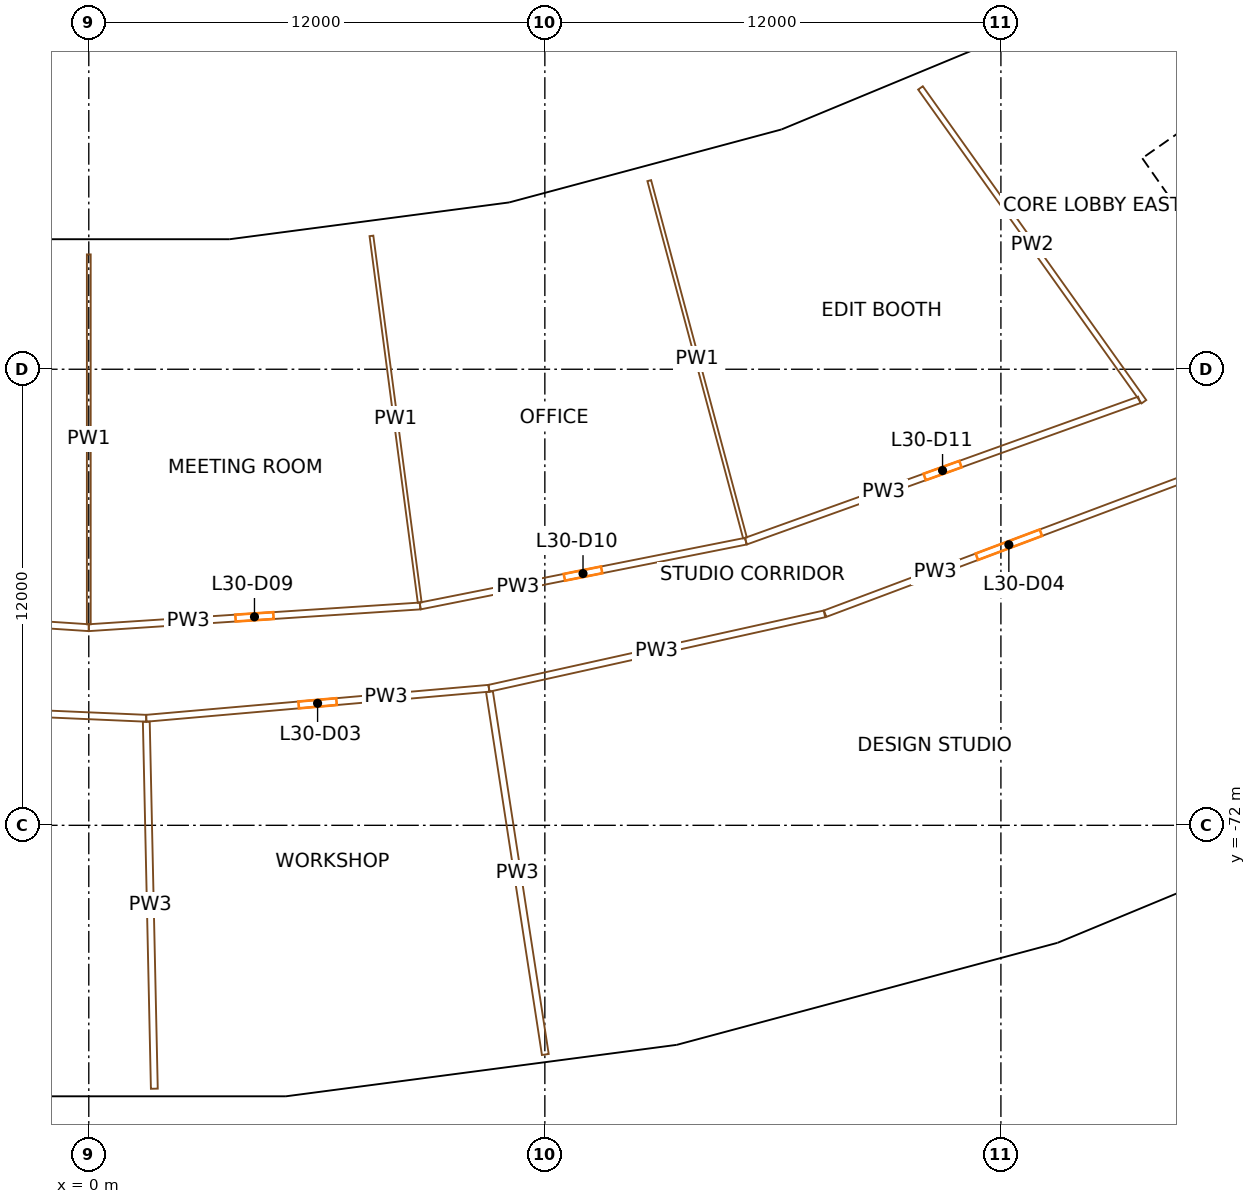
"""IFC4 building model, lengths in metres.
Left out: names, types, materials, properties, quantities, classifications, styles, units other than length and angle.
Written with IfcOpenShell. Run it as: python <this file> out.ifc"""

import sys

from ifc_helpers import new_model, si_unit, direction, frame, frame_2d, origin, origin_2d, place, context, subcontext, project, spatial, rectangle, extrude, element, fill, save


model = new_model("IFC4")
c1 = context("Model", 3, precision=1e-05, world=origin(), true_north=direction((0.0, 1.0)))
c2 = subcontext(c1, "Body", "Model", "MODEL_VIEW")
j1 = project(units=[si_unit("LENGTHUNIT", "METRE"), si_unit("PLANEANGLEUNIT", "RADIAN")], contexts=[c1])
p1 = place(None, origin())
s1 = spatial("IfcSite", under=j1, at=p1, CompositionType="ELEMENT")
p2 = place(p1, origin())
s2 = spatial("IfcBuilding", under=s1, at=p2, CompositionType="ELEMENT")
p3 = place(p2, frame((0.0, 0.0, 132.9)))
s3 = spatial("IfcBuildingStorey", under=s2, at=p3, CompositionType="ELEMENT", Elevation=132.9)
for number, where, z_axis, x_axis in (
    (1, (3.81, -58.125, 0.0), (0.0, 0.0, 1.0), (0.998, 0.065, 0.0)),
    (2, (5.085, -77.583, 0.0), (0.0, 0.0, 1.0), (0.998, 0.065, 0.0)),
    (3, (11.364, -57.131, 0.0), (0.0, 0.0, 1.0), (0.981, 0.195, 0.0)),
    (4, (15.168, -76.256, 0.0), (0.0, 0.0, 1.0), (0.981, 0.195, 0.0)),
    (5, (18.724, -55.159, 0.0), (0.0, 0.0, 1.0), (0.947, 0.321, 0.0)),
    (6, (24.992, -73.624, 0.0), (0.0, 0.0, 1.0), (0.947, 0.321, 0.0)),
    (7, (25.763, -52.243, 0.0), (0.0, 0.0, 1.0), (0.897, 0.442, 0.0)),
):
    element("IfcColumn", number, at=place(p3, frame(where, z_axis=z_axis, x_axis=x_axis)), inside=s3, PredefinedType="COLUMN", context=c2, shape_type="SweptSolid", body=[
        extrude(rectangle(XDim=1.2, YDim=1.5, at=origin_2d()), origin(), (0.0, 0.0, 1.0), 3.8),
    ])
p4 = place(p3, frame((36.717, -66.337, 0.0), z_axis=(0.0, 0.0, 1.0), x_axis=(-0.573577477574, 0.819151315216, 0.0)))
e8 = element("IfcWall", 8, at=p4, inside=s3, PredefinedType="SHEAR", context=c2, shape_type="SweptSolid", body=[
    extrude(rectangle(XDim=14.8, YDim=0.9, at=frame_2d((7.4, 0.0))), origin(), (0.0, 0.0, 1.0), 3.5),
])
p5 = place(p4, frame((6.2, 0.0, 0.0)))
e9 = element("IfcOpeningElement", 9, at=p5, cuts=e8, PredefinedType="OPENING", context=c2, shape_type="SweptSolid", body=[
    extrude(rectangle(XDim=2.4, YDim=2.1, at=frame_2d((1.2, 1.05))), frame((0.0, 0.46, 0.0), z_axis=(0.0, -1.0, 0.0), x_axis=(1.0, 0.0, 0.0)), (0.0, 0.0, 1.0), 0.92),
])
p6 = place(p3, frame((28.854, -54.324, 0.0), z_axis=(0.0, 0.0, 1.0), x_axis=(0.819145767589, 0.573585400304, 0.0)))
e10 = element("IfcWall", 10, at=p6, inside=s3, PredefinedType="SHEAR", context=c2, shape_type="SweptSolid", body=[
    extrude(rectangle(XDim=15.045, YDim=0.9, at=frame_2d((7.523, 0.0))), origin(), (0.0, 0.0, 1.0), 3.5),
])
p7 = place(p6, frame((0.5, 0.0, 0.0)))
e11 = element("IfcOpeningElement", 11, at=p7, cuts=e10, PredefinedType="OPENING", context=c2, shape_type="SweptSolid", body=[
    extrude(rectangle(XDim=1.0, YDim=2.1, at=frame_2d((0.5, 1.05))), frame((0.0, 0.46, 0.0), z_axis=(0.0, -1.0, 0.0), x_axis=(1.0, 0.0, 0.0)), (0.0, 0.0, 1.0), 0.92),
])
p8 = place(p6, frame((2.625, 0.0, 0.0)))
e12 = element("IfcOpeningElement", 12, at=p8, cuts=e10, PredefinedType="OPENING", context=c2, shape_type="SweptSolid", body=[
    extrude(rectangle(XDim=1.0, YDim=2.1, at=frame_2d((0.5, 1.05))), frame((0.0, 0.46, 0.0), z_axis=(0.0, -1.0, 0.0), x_axis=(1.0, 0.0, 0.0)), (0.0, 0.0, 1.0), 0.92),
])
p9 = place(p6, frame((5.625, 0.0, 0.0)))
e13 = element("IfcOpeningElement", 13, at=p9, cuts=e10, PredefinedType="OPENING", context=c2, shape_type="SweptSolid", body=[
    extrude(rectangle(XDim=0.9, YDim=2.1, at=frame_2d((0.45, 1.05))), frame((0.0, 0.46, 0.0), z_axis=(0.0, -1.0, 0.0), x_axis=(1.0, 0.0, 0.0)), (0.0, 0.0, 1.0), 0.92),
])
p10 = place(p6, frame((13.495, 0.0, 0.0)))
e14 = element("IfcOpeningElement", 14, at=p10, cuts=e10, PredefinedType="OPENING", context=c2, shape_type="SweptSolid", body=[
    extrude(rectangle(XDim=1.1, YDim=2.1, at=frame_2d((0.55, 1.05))), frame((0.0, 0.46, 0.0), z_axis=(0.0, -1.0, 0.0), x_axis=(1.0, 0.0, 0.0)), (0.0, 0.0, 1.0), 0.92),
])
p11 = place(p3, frame((11.125, -55.804, 0.0), z_axis=(0.0, 0.0, 1.0), x_axis=(-0.991444533306, -0.130528684121, 0.0)))
e15 = element("IfcWall", 15, at=p11, inside=s3, PredefinedType="SOLIDWALL", context=c2, shape_type="SweptSolid", body=[
    extrude(rectangle(XDim=7.493, YDim=0.4, at=frame_2d((3.747, 0.0))), origin(), (0.0, 0.0, 1.0), 2.7),
])
p12 = place(p11, frame((4.301, 0.0, 0.9)))
e16 = element("IfcOpeningElement", 16, at=p12, cuts=e15, PredefinedType="OPENING", context=c2, shape_type="SweptSolid", body=[
    extrude(rectangle(XDim=2.6, YDim=1.65, at=frame_2d((1.3, 0.825))), frame((0.0, 0.21, 0.0), z_axis=(0.0, -1.0, 0.0), x_axis=(1.0, 0.0, 0.0)), (0.0, 0.0, 1.0), 0.42),
])
p13 = place(p11, frame((0.592, 0.0, 0.9)))
e17 = element("IfcOpeningElement", 17, at=p13, cuts=e15, PredefinedType="OPENING", context=c2, shape_type="SweptSolid", body=[
    extrude(rectangle(XDim=2.6, YDim=1.65, at=frame_2d((1.3, 0.825))), frame((0.0, 0.21, 0.0), z_axis=(0.0, -1.0, 0.0), x_axis=(1.0, 0.0, 0.0)), (0.0, 0.0, 1.0), 0.42),
])
p14 = place(p3, frame((18.241, -53.894, 0.0), z_axis=(0.0, 0.0, 1.0), x_axis=(-0.965924597867, -0.258823629594, 0.0)))
e18 = element("IfcWall", 18, at=p14, inside=s3, PredefinedType="SOLIDWALL", context=c2, shape_type="SweptSolid", body=[
    extrude(rectangle(XDim=7.342, YDim=0.4, at=frame_2d((3.671, 0.0))), origin(), (0.0, 0.0, 1.0), 2.7),
])
p15 = place(p14, frame((4.225, 0.0, 0.9)))
e19 = element("IfcOpeningElement", 19, at=p15, cuts=e18, PredefinedType="OPENING", context=c2, shape_type="SweptSolid", body=[
    extrude(rectangle(XDim=2.6, YDim=1.65, at=frame_2d((1.3, 0.825))), frame((0.0, 0.21, 0.0), z_axis=(0.0, -1.0, 0.0), x_axis=(1.0, 0.0, 0.0)), (0.0, 0.0, 1.0), 0.42),
])
p16 = place(p14, frame((0.517, 0.0, 0.9)))
e20 = element("IfcOpeningElement", 20, at=p16, cuts=e18, PredefinedType="OPENING", context=c2, shape_type="SweptSolid", body=[
    extrude(rectangle(XDim=2.6, YDim=1.65, at=frame_2d((1.3, 0.825))), frame((0.0, 0.21, 0.0), z_axis=(0.0, -1.0, 0.0), x_axis=(1.0, 0.0, 0.0)), (0.0, 0.0, 1.0), 0.42),
])
p17 = place(p3, frame((25.189, -51.023, 0.0), z_axis=(0.0, 0.0, 1.0), x_axis=(-0.923879826967, -0.382682721486, 0.0)))
e21 = element("IfcWall", 21, at=p17, inside=s3, PredefinedType="SOLIDWALL", context=c2, shape_type="SweptSolid", body=[
    extrude(rectangle(XDim=7.493, YDim=0.4, at=frame_2d((3.747, 0.0))), origin(), (0.0, 0.0, 1.0), 2.7),
])
p18 = place(p17, frame((4.301, 0.0, 0.9)))
e22 = element("IfcOpeningElement", 22, at=p18, cuts=e21, PredefinedType="OPENING", context=c2, shape_type="SweptSolid", body=[
    extrude(rectangle(XDim=2.6, YDim=1.65, at=frame_2d((1.3, 0.825))), frame((0.0, 0.21, 0.0), z_axis=(0.0, -1.0, 0.0), x_axis=(1.0, 0.0, 0.0)), (0.0, 0.0, 1.0), 0.42),
])
p19 = place(p17, frame((0.592, 0.0, 0.9)))
e23 = element("IfcOpeningElement", 23, at=p19, cuts=e21, PredefinedType="OPENING", context=c2, shape_type="SweptSolid", body=[
    extrude(rectangle(XDim=2.6, YDim=1.65, at=frame_2d((1.3, 0.825))), frame((0.0, 0.21, 0.0), z_axis=(0.0, -1.0, 0.0), x_axis=(1.0, 0.0, 0.0)), (0.0, 0.0, 1.0), 0.42),
])
p20 = place(p3, frame((3.671, -56.779, 0.0), z_axis=(0.0, 0.0, 1.0), x_axis=(-1.0, 0.0, 0.0)))
e24 = element("IfcWall", 24, at=p20, inside=s3, PredefinedType="SOLIDWALL", context=c2, shape_type="SweptSolid", body=[
    extrude(rectangle(XDim=7.341, YDim=0.4, at=frame_2d((3.671, 0.0))), origin(), (0.0, 0.0, 1.0), 2.7),
])
p21 = place(p20, frame((4.225, 0.0, 0.9)))
e25 = element("IfcOpeningElement", 25, at=p21, cuts=e24, PredefinedType="OPENING", context=c2, shape_type="SweptSolid", body=[
    extrude(rectangle(XDim=2.6, YDim=1.65, at=frame_2d((1.3, 0.825))), frame((0.0, 0.21, 0.0), z_axis=(0.0, -1.0, 0.0), x_axis=(1.0, 0.0, 0.0)), (0.0, 0.0, 1.0), 0.42),
])
p22 = place(p20, frame((0.517, 0.0, 0.9)))
e26 = element("IfcOpeningElement", 26, at=p22, cuts=e24, PredefinedType="OPENING", context=c2, shape_type="SweptSolid", body=[
    extrude(rectangle(XDim=2.6, YDim=1.65, at=frame_2d((1.3, 0.825))), frame((0.0, 0.21, 0.0), z_axis=(0.0, -1.0, 0.0), x_axis=(1.0, 0.0, 0.0)), (0.0, 0.0, 1.0), 0.42),
])
p23 = place(p3, frame((-8.719, -66.229, 0.0), z_axis=(0.0, 0.0, 1.0), x_axis=(0.997858593599, -0.065408158359, 0.0)))
e27 = element("IfcWall", 27, at=p23, inside=s3, PredefinedType="PARTITIONING", context=c2, shape_type="SweptSolid", body=[
    extrude(rectangle(XDim=8.738, YDim=0.18, at=frame_2d((4.369, 0.0))), origin(), (0.0, 0.0, 1.0), 2.4),
])
p24 = place(p23, frame((3.869, 0.0, 0.0)))
e28 = element("IfcOpeningElement", 28, at=p24, cuts=e27, PredefinedType="OPENING", context=c2, shape_type="SweptSolid", body=[
    extrude(rectangle(XDim=1.0, YDim=2.1, at=frame_2d((0.5, 1.05))), frame((0.0, 0.1, 0.0), z_axis=(0.0, -1.0, 0.0), x_axis=(1.0, 0.0, 0.0)), (0.0, 0.0, 1.0), 0.2),
])
p25 = place(p3, frame((-7.523, -68.789, 0.0), z_axis=(0.0, 0.0, 1.0), x_axis=(0.999048962102, -0.043602423354, 0.0)))
e29 = element("IfcWall", 29, at=p25, inside=s3, PredefinedType="PARTITIONING", context=c2, shape_type="SweptSolid", body=[
    extrude(rectangle(XDim=9.043, YDim=0.18, at=frame_2d((4.521, 0.0))), origin(), (0.0, 0.0, 1.0), 2.4),
])
p26 = place(p3, frame((0.0, -66.8, 0.0), z_axis=(0.0, 0.0, 1.0), x_axis=(0.997858593599, 0.065408158359, 0.0)))
e30 = element("IfcWall", 30, at=p26, inside=s3, PredefinedType="PARTITIONING", context=c2, shape_type="SweptSolid", body=[
    extrude(rectangle(XDim=8.738, YDim=0.18, at=frame_2d((4.369, 0.0))), origin(), (0.0, 0.0, 1.0), 2.4),
])
p27 = place(p26, frame((3.869, 0.0, 0.0)))
e31 = element("IfcOpeningElement", 31, at=p27, cuts=e30, PredefinedType="OPENING", context=c2, shape_type="SweptSolid", body=[
    extrude(rectangle(XDim=1.0, YDim=2.1, at=frame_2d((0.5, 1.05))), frame((0.0, 0.1, 0.0), z_axis=(0.0, -1.0, 0.0), x_axis=(1.0, 0.0, 0.0)), (0.0, 0.0, 1.0), 0.2),
])
p28 = place(p3, frame((0.0, -56.979, 0.0), z_axis=(0.0, 0.0, 1.0), x_axis=(0.0, -1.0, 0.0)))
e32 = element("IfcWall", 32, at=p28, inside=s3, PredefinedType="PARTITIONING", context=c2, shape_type="SweptSolid", body=[
    extrude(rectangle(XDim=9.731, YDim=0.1, at=frame_2d((4.866, 0.0))), origin(), (0.0, 0.0, 1.0), 2.4),
])
p29 = place(p3, frame((10.529, -68.394, 0.0), z_axis=(0.0, 0.0, 1.0), x_axis=(-0.996190935779, -0.087198735491, 0.0)))
e33 = element("IfcWall", 33, at=p29, inside=s3, PredefinedType="PARTITIONING", context=c2, shape_type="SweptSolid", body=[
    extrude(rectangle(XDim=9.052, YDim=0.18, at=frame_2d((4.526, 0.0))), origin(), (0.0, 0.0, 1.0), 2.4),
])
p30 = place(p29, frame((4.026, 0.0, 0.0)))
e34 = element("IfcOpeningElement", 34, at=p30, cuts=e33, PredefinedType="OPENING", context=c2, shape_type="SweptSolid", body=[
    extrude(rectangle(XDim=1.0, YDim=2.1, at=frame_2d((0.5, 1.05))), frame((0.0, 0.1, 0.0), z_axis=(0.0, -1.0, 0.0), x_axis=(1.0, 0.0, 0.0)), (0.0, 0.0, 1.0), 0.2),
])
p31 = place(p3, frame((1.724, -78.93, 0.0), z_axis=(0.0, 0.0, 1.0), x_axis=(-0.021838346282, 0.999761514878, 0.0)))
e35 = element("IfcWall", 35, at=p31, inside=s3, PredefinedType="PARTITIONING", context=c2, shape_type="SweptSolid", body=[
    extrude(rectangle(XDim=9.659, YDim=0.18, at=frame_2d((4.83, 0.0))), origin(), (0.0, 0.0, 1.0), 2.4),
])
p32 = place(p3, frame((7.437, -56.491, 0.0), z_axis=(0.0, 0.0, 1.0), x_axis=(0.130531739513, -0.991444131043, 0.0)))
e36 = element("IfcWall", 36, at=p32, inside=s3, PredefinedType="PARTITIONING", context=c2, shape_type="SweptSolid", body=[
    extrude(rectangle(XDim=9.731, YDim=0.1, at=frame_2d((4.866, 0.0))), origin(), (0.0, 0.0, 1.0), 2.4),
])
p33 = place(p3, frame((8.719, -66.229, 0.0), z_axis=(0.0, 0.0, 1.0), x_axis=(0.980786466832, 0.195084357342, 0.0)))
e37 = element("IfcWall", 37, at=p33, inside=s3, PredefinedType="PARTITIONING", context=c2, shape_type="SweptSolid", body=[
    extrude(rectangle(XDim=8.738, YDim=0.18, at=frame_2d((4.369, 0.0))), origin(), (0.0, 0.0, 1.0), 2.4),
])
p34 = place(p33, frame((3.869, 0.0, 0.0)))
e38 = element("IfcOpeningElement", 38, at=p34, cuts=e37, PredefinedType="OPENING", context=c2, shape_type="SweptSolid", body=[
    extrude(rectangle(XDim=1.0, YDim=2.1, at=frame_2d((0.5, 1.05))), frame((0.0, 0.1, 0.0), z_axis=(0.0, -1.0, 0.0), x_axis=(1.0, 0.0, 0.0)), (0.0, 0.0, 1.0), 0.2),
])
p35 = place(p3, frame((10.529, -68.394, 0.0), z_axis=(0.0, 0.0, 1.0), x_axis=(0.976293034631, 0.216453021533, 0.0)))
e39 = element("IfcWall", 39, at=p35, inside=s3, PredefinedType="PARTITIONING", context=c2, shape_type="SweptSolid", body=[
    extrude(rectangle(XDim=9.042, YDim=0.18, at=frame_2d((4.521, 0.0))), origin(), (0.0, 0.0, 1.0), 2.4),
])
p36 = place(p3, frame((12.012, -78.03, 0.0), z_axis=(0.0, 0.0, 1.0), x_axis=(-0.152159747281, 0.988355913276, 0.0)))
e40 = element("IfcWall", 40, at=p36, inside=s3, PredefinedType="PARTITIONING", context=c2, shape_type="SweptSolid", body=[
    extrude(rectangle(XDim=9.659, YDim=0.18, at=frame_2d((4.83, 0.0))), origin(), (0.0, 0.0, 1.0), 2.4),
])
p37 = place(p3, frame((14.747, -55.037, 0.0), z_axis=(0.0, 0.0, 1.0), x_axis=(0.258828880572, -0.965923190829, 0.0)))
e41 = element("IfcWall", 41, at=p37, inside=s3, PredefinedType="PARTITIONING", context=c2, shape_type="SweptSolid", body=[
    extrude(rectangle(XDim=9.731, YDim=0.1, at=frame_2d((4.866, 0.0))), origin(), (0.0, 0.0, 1.0), 2.4),
])
p38 = place(p3, frame((17.289, -64.524, 0.0), z_axis=(0.0, 0.0, 1.0), x_axis=(0.941150861554, 0.337986768669, 0.0)))
e42 = element("IfcWall", 42, at=p38, inside=s3, PredefinedType="PARTITIONING", context=c2, shape_type="SweptSolid", body=[
    extrude(rectangle(XDim=10.998, YDim=0.18, at=frame_2d((5.499, 0.0))), origin(), (0.0, 0.0, 1.0), 2.4),
])
p39 = place(p38, frame((4.999, 0.0, 0.0)))
e43 = element("IfcOpeningElement", 43, at=p39, cuts=e42, PredefinedType="OPENING", context=c2, shape_type="SweptSolid", body=[
    extrude(rectangle(XDim=1.0, YDim=2.1, at=frame_2d((0.5, 1.05))), frame((0.0, 0.1, 0.0), z_axis=(0.0, -1.0, 0.0), x_axis=(1.0, 0.0, 0.0)), (0.0, 0.0, 1.0), 0.2),
])
p40 = place(p3, frame((29.043, -62.803, 0.0), z_axis=(0.0, 0.0, 1.0), x_axis=(-0.936226153734, -0.351398049318, 0.0)))
e44 = element("IfcWall", 44, at=p40, inside=s3, PredefinedType="PARTITIONING", context=c2, shape_type="SweptSolid", body=[
    extrude(rectangle(XDim=10.327, YDim=0.18, at=frame_2d((5.164, 0.0))), origin(), (0.0, 0.0, 1.0), 2.4),
])
p41 = place(p40, frame((4.263, 0.0, 0.0)))
e45 = element("IfcOpeningElement", 45, at=p41, cuts=e44, PredefinedType="OPENING", context=c2, shape_type="SweptSolid", body=[
    extrude(rectangle(XDim=1.8, YDim=2.1, at=frame_2d((0.9, 1.05))), frame((0.0, 0.1, 0.0), z_axis=(0.0, -1.0, 0.0), x_axis=(1.0, 0.0, 0.0)), (0.0, 0.0, 1.0), 0.2),
])
p42 = place(p3, frame((21.884, -52.598, 0.0), z_axis=(0.0, 0.0, 1.0), x_axis=(0.580023139251, -0.814599998732, 0.0)))
e46 = element("IfcWall", 46, at=p42, inside=s3, PredefinedType="PARTITIONING", context=c2, shape_type="SweptSolid", body=[
    extrude(rectangle(XDim=10.136, YDim=0.15, at=frame_2d((5.068, 0.0))), origin(), (0.0, 0.0, 1.0), 2.4),
])
p43 = place(p21, origin())
e47 = element("IfcWindow", 47, at=p43, inside=s3, PartitioningType="SINGLE_PANEL", PredefinedType="WINDOW", context=c2, shape_type="SweptSolid", body=[
    extrude(rectangle(XDim=2.6, YDim=1.65, at=frame_2d((1.3, 0.825))), frame((0.0, 0.03, 0.0), z_axis=(0.0, -1.0, 0.0), x_axis=(1.0, 0.0, 0.0)), (0.0, 0.0, 1.0), 0.06),
])
fill(e25, e47)
p44 = place(p22, origin())
e48 = element("IfcWindow", 48, at=p44, inside=s3, PartitioningType="SINGLE_PANEL", PredefinedType="WINDOW", context=c2, shape_type="SweptSolid", body=[
    extrude(rectangle(XDim=2.6, YDim=1.65, at=frame_2d((1.3, 0.825))), frame((0.0, 0.03, 0.0), z_axis=(0.0, -1.0, 0.0), x_axis=(1.0, 0.0, 0.0)), (0.0, 0.0, 1.0), 0.06),
])
fill(e26, e48)
p45 = place(p12, origin())
e49 = element("IfcWindow", 49, at=p45, inside=s3, PartitioningType="SINGLE_PANEL", PredefinedType="WINDOW", context=c2, shape_type="SweptSolid", body=[
    extrude(rectangle(XDim=2.6, YDim=1.65, at=frame_2d((1.3, 0.825))), frame((0.0, 0.03, 0.0), z_axis=(0.0, -1.0, 0.0), x_axis=(1.0, 0.0, 0.0)), (0.0, 0.0, 1.0), 0.06),
])
fill(e16, e49)
p46 = place(p13, origin())
e50 = element("IfcWindow", 50, at=p46, inside=s3, PartitioningType="SINGLE_PANEL", PredefinedType="WINDOW", context=c2, shape_type="SweptSolid", body=[
    extrude(rectangle(XDim=2.6, YDim=1.65, at=frame_2d((1.3, 0.825))), frame((0.0, 0.03, 0.0), z_axis=(0.0, -1.0, 0.0), x_axis=(1.0, 0.0, 0.0)), (0.0, 0.0, 1.0), 0.06),
])
fill(e17, e50)
p47 = place(p15, origin())
e51 = element("IfcWindow", 51, at=p47, inside=s3, PartitioningType="SINGLE_PANEL", PredefinedType="WINDOW", context=c2, shape_type="SweptSolid", body=[
    extrude(rectangle(XDim=2.6, YDim=1.65, at=frame_2d((1.3, 0.825))), frame((0.0, 0.03, 0.0), z_axis=(0.0, -1.0, 0.0), x_axis=(1.0, 0.0, 0.0)), (0.0, 0.0, 1.0), 0.06),
])
fill(e19, e51)
p48 = place(p16, origin())
e52 = element("IfcWindow", 52, at=p48, inside=s3, PartitioningType="SINGLE_PANEL", PredefinedType="WINDOW", context=c2, shape_type="SweptSolid", body=[
    extrude(rectangle(XDim=2.6, YDim=1.65, at=frame_2d((1.3, 0.825))), frame((0.0, 0.03, 0.0), z_axis=(0.0, -1.0, 0.0), x_axis=(1.0, 0.0, 0.0)), (0.0, 0.0, 1.0), 0.06),
])
fill(e20, e52)
p49 = place(p18, origin())
e53 = element("IfcWindow", 53, at=p49, inside=s3, PartitioningType="SINGLE_PANEL", PredefinedType="WINDOW", context=c2, shape_type="SweptSolid", body=[
    extrude(rectangle(XDim=2.6, YDim=1.65, at=frame_2d((1.3, 0.825))), frame((0.0, 0.03, 0.0), z_axis=(0.0, -1.0, 0.0), x_axis=(1.0, 0.0, 0.0)), (0.0, 0.0, 1.0), 0.06),
])
fill(e22, e53)
p50 = place(p19, origin())
e54 = element("IfcWindow", 54, at=p50, inside=s3, PartitioningType="SINGLE_PANEL", PredefinedType="WINDOW", context=c2, shape_type="SweptSolid", body=[
    extrude(rectangle(XDim=2.6, YDim=1.65, at=frame_2d((1.3, 0.825))), frame((0.0, 0.03, 0.0), z_axis=(0.0, -1.0, 0.0), x_axis=(1.0, 0.0, 0.0)), (0.0, 0.0, 1.0), 0.06),
])
fill(e23, e54)
p51 = place(p30, origin())
e55 = element("IfcDoor", 55, at=p51, inside=s3, OperationType="SINGLE_SWING_RIGHT", PredefinedType="DOOR", context=c2, shape_type="SweptSolid", body=[
    extrude(rectangle(XDim=1.0, YDim=2.1, at=frame_2d((0.5, 1.05))), frame((0.0, 0.025, 0.0), z_axis=(0.0, -1.0, 0.0), x_axis=(1.0, 0.0, 0.0)), (0.0, 0.0, 1.0), 0.05),
])
fill(e34, e55)
p52 = place(p41, origin())
e56 = element("IfcDoor", 56, at=p52, inside=s3, OperationType="DOUBLE_DOOR_SINGLE_SWING", PredefinedType="DOOR", context=c2, shape_type="SweptSolid", body=[
    extrude(rectangle(XDim=1.8, YDim=2.1, at=frame_2d((0.9, 1.05))), frame((0.0, 0.025, 0.0), z_axis=(0.0, -1.0, 0.0), x_axis=(1.0, 0.0, 0.0)), (0.0, 0.0, 1.0), 0.05),
])
fill(e45, e56)
p53 = place(p27, origin())
e57 = element("IfcDoor", 57, at=p53, inside=s3, OperationType="SINGLE_SWING_RIGHT", PredefinedType="DOOR", context=c2, shape_type="SweptSolid", body=[
    extrude(rectangle(XDim=1.0, YDim=2.1, at=frame_2d((0.5, 1.05))), frame((0.0, 0.025, 0.0), z_axis=(0.0, -1.0, 0.0), x_axis=(1.0, 0.0, 0.0)), (0.0, 0.0, 1.0), 0.05),
])
fill(e31, e57)
p54 = place(p34, origin())
e58 = element("IfcDoor", 58, at=p54, inside=s3, OperationType="SINGLE_SWING_RIGHT", PredefinedType="DOOR", context=c2, shape_type="SweptSolid", body=[
    extrude(rectangle(XDim=1.0, YDim=2.1, at=frame_2d((0.5, 1.05))), frame((0.0, 0.025, 0.0), z_axis=(0.0, -1.0, 0.0), x_axis=(1.0, 0.0, 0.0)), (0.0, 0.0, 1.0), 0.05),
])
fill(e38, e58)
p55 = place(p39, origin())
e59 = element("IfcDoor", 59, at=p55, inside=s3, OperationType="SINGLE_SWING_RIGHT", PredefinedType="DOOR", context=c2, shape_type="SweptSolid", body=[
    extrude(rectangle(XDim=1.0, YDim=2.1, at=frame_2d((0.5, 1.05))), frame((0.0, 0.025, 0.0), z_axis=(0.0, -1.0, 0.0), x_axis=(1.0, 0.0, 0.0)), (0.0, 0.0, 1.0), 0.05),
])
fill(e43, e59)
save(model, sys.argv[1])
